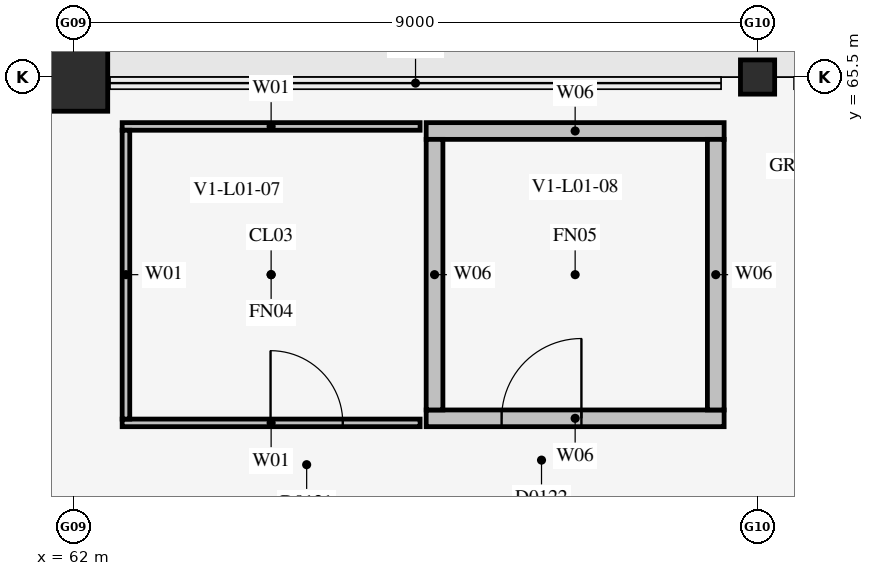
"""IFC4 building model, lengths in metres.
Left out: names, types, materials, properties, quantities, classifications, styles, units other than length and angle.
Written with IfcOpenShell. Run it as: python <this file> out.ifc"""

import sys

from ifc_helpers import new_model, si_unit, direction, frame, frame_2d, origin, origin_2d, place, context, subcontext, project, spatial, rectangle, circle, extrude, element, fill, save


model = new_model("IFC4")
c1 = context("Model", 3, precision=1e-05, world=origin(), true_north=direction((0.0, 1.0)))
c2 = subcontext(c1, "Body", "Model", "MODEL_VIEW")
j1 = project(units=[si_unit("LENGTHUNIT", "METRE"), si_unit("PLANEANGLEUNIT", "RADIAN")], contexts=[c1])
p1 = place(None, origin())
s1 = spatial("IfcSite", under=j1, at=p1, CompositionType="ELEMENT")
p2 = place(p1, origin())
s2 = spatial("IfcBuilding", under=s1, at=p2, CompositionType="ELEMENT")
p3 = place(p2, frame((0.0, 0.0, 5.4)))
s3 = spatial("IfcBuildingStorey", under=s2, at=p3, CompositionType="ELEMENT", Elevation=5.4)
p4 = place(p3, frame((62.0, 65.5, 0.0), z_axis=(0.0, 0.0, 1.0), x_axis=(1.0, 0.0, 0.0)))
e1 = element("IfcColumn", 1, at=p4, inside=s3, PredefinedType="COLUMN", context=c2, shape_type="SweptSolid", body=[
    extrude(circle(Radius=0.45, at=origin_2d()), origin(), (0.0, 0.0, 1.0), 4.48),
])
p5 = place(p3, frame((71.0, 65.5, 0.0), z_axis=(0.0, 0.0, 1.0), x_axis=(1.0, 0.0, 0.0)))
e2 = element("IfcColumn", 2, at=p5, inside=s3, PredefinedType="COLUMN", context=c2, shape_type="SweptSolid", body=[
    extrude(rectangle(XDim=0.45, YDim=0.45, at=origin_2d()), origin(), (0.0, 0.0, 1.0), 4.48),
])
p6 = place(p3, frame((62.64, 60.95, 0.0), z_axis=(0.0, 0.0, 1.0), x_axis=(1.0, 0.0, 0.0)))
e3 = element("IfcWall", 3, at=p6, inside=s3, PredefinedType="PARTITIONING", context=c2, shape_type="SweptSolid", body=[
    extrude(rectangle(XDim=3.92, YDim=0.1, at=frame_2d((1.96, 0.0))), origin(), (0.0, 0.0, 1.0), 4.465),
])
p7 = place(p6, frame((1.952, 0.0, 0.0)))
e4 = element("IfcOpeningElement", 4, at=p7, cuts=e3, PredefinedType="OPENING", context=c2, shape_type="SweptSolid", body=[
    extrude(rectangle(XDim=0.95, YDim=2.15, at=frame_2d((0.475, 1.075))), frame((0.0, 0.062, 0.0), z_axis=(0.0, -1.0, 0.0), x_axis=(1.0, 0.0, 0.0)), (0.0, 0.0, 1.0), 0.124),
])
p8 = place(p3, frame((62.64, 64.85, 0.0), z_axis=(0.0, 0.0, 1.0), x_axis=(1.0, 0.0, 0.0)))
e5 = element("IfcWall", 5, at=p8, inside=s3, PredefinedType="PARTITIONING", context=c2, shape_type="SweptSolid", body=[
    extrude(rectangle(XDim=3.92, YDim=0.1, at=frame_2d((1.96, 0.0))), origin(), (0.0, 0.0, 1.0), 4.465),
])
p9 = place(p3, frame((62.69, 61.0, 0.0), z_axis=(0.0, 0.0, 1.0), x_axis=(0.0, 1.0, 0.0)))
e6 = element("IfcWall", 6, at=p9, inside=s3, PredefinedType="PARTITIONING", context=c2, shape_type="SweptSolid", body=[
    extrude(rectangle(XDim=3.8, YDim=0.1, at=frame_2d((1.9, 0.0))), origin(), (0.0, 0.0, 1.0), 4.465),
])
p10 = place(p3, frame((66.64, 61.01, 0.0), z_axis=(0.0, 0.0, 1.0), x_axis=(1.0, 0.0, 0.0)))
e7 = element("IfcWall", 7, at=p10, inside=s3, PredefinedType="PLUMBINGWALL", context=c2, shape_type="SweptSolid", body=[
    extrude(rectangle(XDim=3.92, YDim=0.22, at=frame_2d((1.96, 0.0))), origin(), (0.0, 0.0, 1.0), 4.465),
])
p11 = place(p10, frame((0.992, 0.0, 0.0)))
e8 = element("IfcOpeningElement", 8, at=p11, cuts=e7, PredefinedType="OPENING", context=c2, shape_type="SweptSolid", body=[
    extrude(rectangle(XDim=1.05, YDim=2.15, at=frame_2d((0.525, 1.075))), frame((0.0, 0.122, 0.0), z_axis=(0.0, -1.0, 0.0), x_axis=(1.0, 0.0, 0.0)), (0.0, 0.0, 1.0), 0.244),
])
p12 = place(p3, frame((66.64, 64.79, 0.0), z_axis=(0.0, 0.0, 1.0), x_axis=(1.0, 0.0, 0.0)))
e9 = element("IfcWall", 9, at=p12, inside=s3, PredefinedType="PLUMBINGWALL", context=c2, shape_type="SweptSolid", body=[
    extrude(rectangle(XDim=3.92, YDim=0.22, at=frame_2d((1.96, 0.0))), origin(), (0.0, 0.0, 1.0), 4.465),
])
for number, where, z_axis, x_axis in (
    (10, (70.45, 61.12, 0.0), (0.0, 0.0, 1.0), (0.0, 1.0, 0.0)),
    (11, (66.75, 61.12, 0.0), (0.0, 0.0, 1.0), (0.0, 1.0, 0.0)),
):
    element("IfcWall", number, at=place(p3, frame(where, z_axis=z_axis, x_axis=x_axis)), inside=s3, PredefinedType="PLUMBINGWALL", context=c2, shape_type="SweptSolid", body=[
        extrude(rectangle(XDim=3.56, YDim=0.22, at=frame_2d((1.78, 0.0))), origin(), (0.0, 0.0, 1.0), 4.465),
    ])
p13 = place(p7, origin())
e12 = element("IfcDoor", 12, at=p13, inside=s3, OperationType="SINGLE_SWING_LEFT", PredefinedType="DOOR", context=c2, shape_type="SweptSolid", body=[
    extrude(rectangle(XDim=0.95, YDim=2.15, at=frame_2d((0.475, 1.075))), frame((0.0, 0.025, 0.0), z_axis=(0.0, -1.0, 0.0), x_axis=(1.0, 0.0, 0.0)), (0.0, 0.0, 1.0), 0.05),
])
fill(e4, e12)
p14 = place(p11, origin())
e13 = element("IfcDoor", 13, at=p14, inside=s3, OperationType="SINGLE_SWING_RIGHT", PredefinedType="DOOR", context=c2, shape_type="SweptSolid", body=[
    extrude(rectangle(XDim=1.05, YDim=2.15, at=frame_2d((0.525, 1.075))), frame((0.0, 0.025, 0.0), z_axis=(0.0, -1.0, 0.0), x_axis=(1.0, 0.0, 0.0)), (0.0, 0.0, 1.0), 0.05),
])
fill(e8, e13)
save(model, sys.argv[1])
